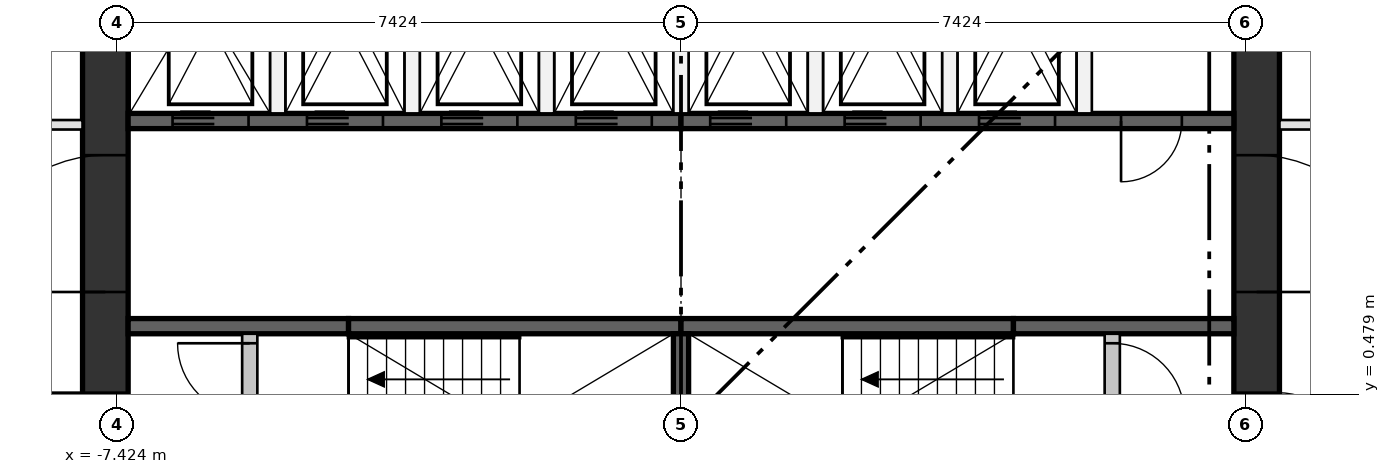
"""IFC4 building model, lengths in metres.
Left out: names, types, materials, properties, quantities, classifications, styles, units other than length and angle.
Written with IfcOpenShell. Run it as: python <this file> out.ifc"""

import sys

from ifc_helpers import new_model, si_unit, direction, frame, frame_2d, origin, place, context, subcontext, project, spatial, rectangle, extrude, element, fill, save


model = new_model("IFC4")
c1 = context("Model", 3, precision=1e-05, world=origin(), true_north=direction((0.0, 1.0)))
c2 = subcontext(c1, "Body", "Model", "MODEL_VIEW")
j1 = project(units=[si_unit("LENGTHUNIT", "METRE"), si_unit("PLANEANGLEUNIT", "RADIAN")], contexts=[c1])
p1 = place(None, origin())
s1 = spatial("IfcSite", under=j1, at=p1, CompositionType="ELEMENT")
p2 = place(p1, origin())
s2 = spatial("IfcBuilding", under=s1, at=p2, CompositionType="ELEMENT")
p3 = place(p2, frame((0.0, 0.0, 131.0)))
s3 = spatial("IfcBuildingStorey", under=s2, at=p3, CompositionType="ELEMENT", Elevation=131.0)
p4 = place(p3, frame((-7.574, -7.274, 0.0), z_axis=(0.0, 0.0, 1.0), x_axis=(0.0, 1.0, 0.0)))
e1 = element("IfcWall", 1, at=p4, inside=s3, PredefinedType="SHEAR", context=c2, shape_type="SweptSolid", body=[
    extrude(rectangle(XDim=14.548, YDim=0.6, at=frame_2d((7.274, 0.0))), origin(), (0.0, 0.0, 1.0), 3.35),
])
p5 = place(p4, frame((6.774, 0.0, 0.0)))
e2 = element("IfcOpeningElement", 2, at=p5, cuts=e1, PredefinedType="OPENING", context=c2, shape_type="SweptSolid", body=[
    extrude(rectangle(XDim=1.0, YDim=2.1, at=frame_2d((0.5, 1.05))), frame((0.0, 0.31, 0.0), z_axis=(0.0, -1.0, 0.0), x_axis=(1.0, 0.0, 0.0)), (0.0, 0.0, 1.0), 0.62),
])
p6 = place(p4, frame((3.649, 0.0, 0.0)))
e3 = element("IfcOpeningElement", 3, at=p6, cuts=e1, PredefinedType="OPENING", context=c2, shape_type="SweptSolid", body=[
    extrude(rectangle(XDim=1.8, YDim=2.1, at=frame_2d((0.9, 1.05))), frame((0.0, 0.31, 0.0), z_axis=(0.0, -1.0, 0.0), x_axis=(1.0, 0.0, 0.0)), (0.0, 0.0, 1.0), 0.62),
])
p7 = place(p4, frame((9.098, 0.0, 0.0)))
e4 = element("IfcOpeningElement", 4, at=p7, cuts=e1, PredefinedType="OPENING", context=c2, shape_type="SweptSolid", body=[
    extrude(rectangle(XDim=1.8, YDim=2.1, at=frame_2d((0.9, 1.05))), frame((0.0, 0.31, 0.0), z_axis=(0.0, -1.0, 0.0), x_axis=(1.0, 0.0, 0.0)), (0.0, 0.0, 1.0), 0.62),
])
p8 = place(p3, frame((7.574, -7.274, 0.0), z_axis=(0.0, 0.0, 1.0), x_axis=(0.0, 1.0, 0.0)))
e5 = element("IfcWall", 5, at=p8, inside=s3, PredefinedType="SHEAR", context=c2, shape_type="SweptSolid", body=[
    extrude(rectangle(XDim=14.548, YDim=0.6, at=frame_2d((7.274, 0.0))), origin(), (0.0, 0.0, 1.0), 3.35),
])
p9 = place(p8, frame((6.774, 0.0, 0.0)))
e6 = element("IfcOpeningElement", 6, at=p9, cuts=e5, PredefinedType="OPENING", context=c2, shape_type="SweptSolid", body=[
    extrude(rectangle(XDim=1.0, YDim=2.1, at=frame_2d((0.5, 1.05))), frame((0.0, 0.31, 0.0), z_axis=(0.0, -1.0, 0.0), x_axis=(1.0, 0.0, 0.0)), (0.0, 0.0, 1.0), 0.62),
])
p10 = place(p8, frame((3.649, 0.0, 0.0)))
e7 = element("IfcOpeningElement", 7, at=p10, cuts=e5, PredefinedType="OPENING", context=c2, shape_type="SweptSolid", body=[
    extrude(rectangle(XDim=1.8, YDim=2.1, at=frame_2d((0.9, 1.05))), frame((0.0, 0.31, 0.0), z_axis=(0.0, -1.0, 0.0), x_axis=(1.0, 0.0, 0.0)), (0.0, 0.0, 1.0), 0.62),
])
p11 = place(p8, frame((9.098, 0.0, 0.0)))
e8 = element("IfcOpeningElement", 8, at=p11, cuts=e5, PredefinedType="OPENING", context=c2, shape_type="SweptSolid", body=[
    extrude(rectangle(XDim=1.8, YDim=2.1, at=frame_2d((0.9, 1.05))), frame((0.0, 0.31, 0.0), z_axis=(0.0, -1.0, 0.0), x_axis=(1.0, 0.0, 0.0)), (0.0, 0.0, 1.0), 0.62),
])
p12 = place(p3, frame((-7.274, 4.074, 0.0), z_axis=(0.0, 0.0, 1.0), x_axis=(1.0, 0.0, 0.0)))
e9 = element("IfcWall", 9, at=p12, inside=s3, PredefinedType="SHEAR", context=c2, shape_type="SweptSolid", body=[
    extrude(rectangle(XDim=7.274, YDim=0.2, at=frame_2d((3.637, 0.0))), origin(), (0.0, 0.0, 1.0), 3.0),
])
p13 = place(p12, frame((0.584, 0.0, 0.0)))
e10 = element("IfcOpeningElement", 10, at=p13, cuts=e9, PredefinedType="OPENING", context=c2, shape_type="SweptSolid", body=[
    extrude(rectangle(XDim=1.0, YDim=2.1, at=frame_2d((0.5, 1.05))), frame((0.0, 0.11, 0.0), z_axis=(0.0, -1.0, 0.0), x_axis=(1.0, 0.0, 0.0)), (0.0, 0.0, 1.0), 0.22),
])
p14 = place(p12, frame((2.353, 0.0, 0.0)))
e11 = element("IfcOpeningElement", 11, at=p14, cuts=e9, PredefinedType="OPENING", context=c2, shape_type="SweptSolid", body=[
    extrude(rectangle(XDim=1.0, YDim=2.1, at=frame_2d((0.5, 1.05))), frame((0.0, 0.11, 0.0), z_axis=(0.0, -1.0, 0.0), x_axis=(1.0, 0.0, 0.0)), (0.0, 0.0, 1.0), 0.22),
])
p15 = place(p12, frame((4.121, 0.0, 0.0)))
e12 = element("IfcOpeningElement", 12, at=p15, cuts=e9, PredefinedType="OPENING", context=c2, shape_type="SweptSolid", body=[
    extrude(rectangle(XDim=1.0, YDim=2.1, at=frame_2d((0.5, 1.05))), frame((0.0, 0.11, 0.0), z_axis=(0.0, -1.0, 0.0), x_axis=(1.0, 0.0, 0.0)), (0.0, 0.0, 1.0), 0.22),
])
p16 = place(p12, frame((5.89, 0.0, 0.0)))
e13 = element("IfcOpeningElement", 13, at=p16, cuts=e9, PredefinedType="OPENING", context=c2, shape_type="SweptSolid", body=[
    extrude(rectangle(XDim=1.0, YDim=2.1, at=frame_2d((0.5, 1.05))), frame((0.0, 0.11, 0.0), z_axis=(0.0, -1.0, 0.0), x_axis=(1.0, 0.0, 0.0)), (0.0, 0.0, 1.0), 0.22),
])
p17 = place(p3, frame((0.0, 4.074, 0.0), z_axis=(0.0, 0.0, 1.0), x_axis=(1.0, 0.0, 0.0)))
e14 = element("IfcWall", 14, at=p17, inside=s3, PredefinedType="SHEAR", context=c2, shape_type="SweptSolid", body=[
    extrude(rectangle(XDim=7.274, YDim=0.2, at=frame_2d((3.637, 0.0))), origin(), (0.0, 0.0, 1.0), 3.0),
])
p18 = place(p17, frame((0.384, 0.0, 0.0)))
e15 = element("IfcOpeningElement", 15, at=p18, cuts=e14, PredefinedType="OPENING", context=c2, shape_type="SweptSolid", body=[
    extrude(rectangle(XDim=1.0, YDim=2.1, at=frame_2d((0.5, 1.05))), frame((0.0, 0.11, 0.0), z_axis=(0.0, -1.0, 0.0), x_axis=(1.0, 0.0, 0.0)), (0.0, 0.0, 1.0), 0.22),
])
p19 = place(p17, frame((2.153, 0.0, 0.0)))
e16 = element("IfcOpeningElement", 16, at=p19, cuts=e14, PredefinedType="OPENING", context=c2, shape_type="SweptSolid", body=[
    extrude(rectangle(XDim=1.0, YDim=2.1, at=frame_2d((0.5, 1.05))), frame((0.0, 0.11, 0.0), z_axis=(0.0, -1.0, 0.0), x_axis=(1.0, 0.0, 0.0)), (0.0, 0.0, 1.0), 0.22),
])
p20 = place(p17, frame((3.921, 0.0, 0.0)))
e17 = element("IfcOpeningElement", 17, at=p20, cuts=e14, PredefinedType="OPENING", context=c2, shape_type="SweptSolid", body=[
    extrude(rectangle(XDim=1.0, YDim=2.1, at=frame_2d((0.5, 1.05))), frame((0.0, 0.11, 0.0), z_axis=(0.0, -1.0, 0.0), x_axis=(1.0, 0.0, 0.0)), (0.0, 0.0, 1.0), 0.22),
])
p21 = place(p17, frame((5.79, 0.0, 0.0)))
e18 = element("IfcOpeningElement", 18, at=p21, cuts=e14, PredefinedType="OPENING", context=c2, shape_type="SweptSolid", body=[
    extrude(rectangle(XDim=0.8, YDim=2.1, at=frame_2d((0.4, 1.05))), frame((0.0, 0.11, 0.0), z_axis=(0.0, -1.0, 0.0), x_axis=(1.0, 0.0, 0.0)), (0.0, 0.0, 1.0), 0.22),
])
p22 = place(p3, frame((-7.274, 1.375, 0.0), z_axis=(0.0, 0.0, 1.0), x_axis=(1.0, 0.0, 0.0)))
e19 = element("IfcWall", 19, at=p22, inside=s3, PredefinedType="SHEAR", context=c2, shape_type="SweptSolid", body=[
    extrude(rectangle(XDim=2.9, YDim=0.2, at=frame_2d((1.45, 0.0))), origin(), (0.0, 0.0, 1.0), 3.0),
])
for number, where, z_axis, x_axis in (
    (20, (-4.374, 1.375, 0.0), (0.0, 0.0, 1.0), (1.0, 0.0, 0.0)),
    (21, (0.0, 1.375, 0.0), (0.0, 0.0, 1.0), (1.0, 0.0, 0.0)),
):
    element("IfcWall", number, at=place(p3, frame(where, z_axis=z_axis, x_axis=x_axis)), inside=s3, PredefinedType="SHEAR", context=c2, shape_type="SweptSolid", body=[
        extrude(rectangle(XDim=4.374, YDim=0.2, at=frame_2d((2.187, 0.0))), origin(), (0.0, 0.0, 1.0), 3.0),
    ])
p23 = place(p3, frame((4.374, 1.375, 0.0), z_axis=(0.0, 0.0, 1.0), x_axis=(1.0, 0.0, 0.0)))
e22 = element("IfcWall", 22, at=p23, inside=s3, PredefinedType="SHEAR", context=c2, shape_type="SweptSolid", body=[
    extrude(rectangle(XDim=2.9, YDim=0.2, at=frame_2d((1.45, 0.0))), origin(), (0.0, 0.0, 1.0), 3.0),
])
p24 = place(p3, frame((0.0, -1.275, 0.0), z_axis=(0.0, 0.0, 1.0), x_axis=(0.0, 1.0, 0.0)))
e23 = element("IfcWall", 23, at=p24, inside=s3, PredefinedType="SHEAR", context=c2, shape_type="SweptSolid", body=[
    extrude(rectangle(XDim=2.55, YDim=0.2, at=frame_2d((1.275, 0.0))), origin(), (0.0, 0.0, 1.0), 3.0),
])
for number, where, z_axis, x_axis in (
    (24, (-5.305, 4.174, 0.0), (0.0, 0.0, 1.0), (0.0, 1.0, 0.0)),
    (25, (-3.537, 4.174, 0.0), (0.0, 0.0, 1.0), (0.0, 1.0, 0.0)),
    (26, (-1.769, 4.174, 0.0), (0.0, 0.0, 1.0), (0.0, 1.0, 0.0)),
    (27, (0.0, 4.174, 0.0), (0.0, 0.0, 1.0), (0.0, 1.0, 0.0)),
    (28, (1.769, 4.174, 0.0), (0.0, 0.0, 1.0), (0.0, 1.0, 0.0)),
    (29, (3.537, 4.174, 0.0), (0.0, 0.0, 1.0), (0.0, 1.0, 0.0)),
    (30, (5.305, 4.174, 0.0), (0.0, 0.0, 1.0), (0.0, 1.0, 0.0)),
):
    element("IfcWall", number, at=place(p3, frame(where, z_axis=z_axis, x_axis=x_axis)), inside=s3, PredefinedType="PARTITIONING", context=c2, shape_type="SweptSolid", body=[
        extrude(rectangle(XDim=3.1, YDim=0.2, at=frame_2d((1.55, 0.0))), origin(), (0.0, 0.0, 1.0), 3.0),
    ])
p25 = place(p3, frame((-5.674, -1.275, 0.0), z_axis=(0.0, 0.0, 1.0), x_axis=(0.0, 1.0, 0.0)))
e31 = element("IfcWall", 31, at=p25, inside=s3, PredefinedType="PARTITIONING", context=c2, shape_type="SweptSolid", body=[
    extrude(rectangle(XDim=2.55, YDim=0.2, at=frame_2d((1.275, 0.0))), origin(), (0.0, 0.0, 1.0), 3.0),
])
p26 = place(p25, frame((0.125, 0.0, 0.0)))
e32 = element("IfcOpeningElement", 32, at=p26, cuts=e31, PredefinedType="OPENING", context=c2, shape_type="SweptSolid", body=[
    extrude(rectangle(XDim=0.95, YDim=2.1, at=frame_2d((0.475, 1.05))), frame((0.0, 0.11, 0.0), z_axis=(0.0, -1.0, 0.0), x_axis=(1.0, 0.0, 0.0)), (0.0, 0.0, 1.0), 0.22),
])
p27 = place(p25, frame((1.475, 0.0, 0.0)))
e33 = element("IfcOpeningElement", 33, at=p27, cuts=e31, PredefinedType="OPENING", context=c2, shape_type="SweptSolid", body=[
    extrude(rectangle(XDim=0.95, YDim=2.1, at=frame_2d((0.475, 1.05))), frame((0.0, 0.11, 0.0), z_axis=(0.0, -1.0, 0.0), x_axis=(1.0, 0.0, 0.0)), (0.0, 0.0, 1.0), 0.22),
])
p28 = place(p3, frame((5.674, -1.275, 0.0), z_axis=(0.0, 0.0, 1.0), x_axis=(0.0, 1.0, 0.0)))
e34 = element("IfcWall", 34, at=p28, inside=s3, PredefinedType="PARTITIONING", context=c2, shape_type="SweptSolid", body=[
    extrude(rectangle(XDim=2.55, YDim=0.2, at=frame_2d((1.275, 0.0))), origin(), (0.0, 0.0, 1.0), 3.0),
])
p29 = place(p28, frame((0.125, 0.0, 0.0)))
e35 = element("IfcOpeningElement", 35, at=p29, cuts=e34, PredefinedType="OPENING", context=c2, shape_type="SweptSolid", body=[
    extrude(rectangle(XDim=0.95, YDim=2.1, at=frame_2d((0.475, 1.05))), frame((0.0, 0.11, 0.0), z_axis=(0.0, -1.0, 0.0), x_axis=(1.0, 0.0, 0.0)), (0.0, 0.0, 1.0), 0.22),
])
p30 = place(p28, frame((1.475, 0.0, 0.0)))
e36 = element("IfcOpeningElement", 36, at=p30, cuts=e34, PredefinedType="OPENING", context=c2, shape_type="SweptSolid", body=[
    extrude(rectangle(XDim=0.95, YDim=2.1, at=frame_2d((0.475, 1.05))), frame((0.0, 0.11, 0.0), z_axis=(0.0, -1.0, 0.0), x_axis=(1.0, 0.0, 0.0)), (0.0, 0.0, 1.0), 0.22),
])
p31 = place(p3, frame((7.874, 4.024, 0.0), z_axis=(0.0, 0.0, 1.0), x_axis=(1.0, 0.0, 0.0)))
e37 = element("IfcWall", 37, at=p31, inside=s3, PredefinedType="PARTITIONING", context=c2, shape_type="SweptSolid", body=[
    extrude(rectangle(XDim=4.983, YDim=0.125, at=frame_2d((2.491, 0.0))), origin(), (0.0, 0.0, 1.0), 3.0),
])
p32 = place(p31, frame((2.0, 0.0, 0.0)))
e38 = element("IfcOpeningElement", 38, at=p32, cuts=e37, PredefinedType="OPENING", context=c2, shape_type="SweptSolid", body=[
    extrude(rectangle(XDim=1.0, YDim=2.1, at=frame_2d((0.5, 1.05))), frame((0.0, 0.073, 0.0), z_axis=(0.0, -1.0, 0.0), x_axis=(1.0, 0.0, 0.0)), (0.0, 0.0, 1.0), 0.145),
])
p33 = place(p3, frame((-14.332, 4.024, 0.0), z_axis=(0.0, 0.0, 1.0), x_axis=(1.0, 0.0, 0.0)))
e39 = element("IfcWall", 39, at=p33, inside=s3, PredefinedType="PARTITIONING", context=c2, shape_type="SweptSolid", body=[
    extrude(rectangle(XDim=6.458, YDim=0.125, at=frame_2d((3.229, 0.0))), origin(), (0.0, 0.0, 1.0), 3.0),
])
p34 = place(p33, frame((2.7, 0.0, 0.0)))
e40 = element("IfcOpeningElement", 40, at=p34, cuts=e39, PredefinedType="OPENING", context=c2, shape_type="SweptSolid", body=[
    extrude(rectangle(XDim=1.0, YDim=2.1, at=frame_2d((0.5, 1.05))), frame((0.0, 0.073, 0.0), z_axis=(0.0, -1.0, 0.0), x_axis=(1.0, 0.0, 0.0)), (0.0, 0.0, 1.0), 0.145),
])
p35 = place(p13, frame((1.0, 0.0, 0.0), z_axis=(0.0, 0.0, 1.0), x_axis=(-1.0, 0.0, 0.0)))
e41 = element("IfcDoor", 41, at=p35, inside=s3, OperationType="DOUBLE_DOOR_SLIDING", PredefinedType="DOOR", context=c2, shape_type="SweptSolid", body=[
    extrude(rectangle(XDim=1.0, YDim=2.1, at=frame_2d((0.5, 1.05))), frame((0.0, 0.025, 0.0), z_axis=(0.0, -1.0, 0.0), x_axis=(1.0, 0.0, 0.0)), (0.0, 0.0, 1.0), 0.05),
])
fill(e10, e41)
p36 = place(p14, frame((1.0, 0.0, 0.0), z_axis=(0.0, 0.0, 1.0), x_axis=(-1.0, 0.0, 0.0)))
e42 = element("IfcDoor", 42, at=p36, inside=s3, OperationType="DOUBLE_DOOR_SLIDING", PredefinedType="DOOR", context=c2, shape_type="SweptSolid", body=[
    extrude(rectangle(XDim=1.0, YDim=2.1, at=frame_2d((0.5, 1.05))), frame((0.0, 0.025, 0.0), z_axis=(0.0, -1.0, 0.0), x_axis=(1.0, 0.0, 0.0)), (0.0, 0.0, 1.0), 0.05),
])
fill(e11, e42)
p37 = place(p15, frame((1.0, 0.0, 0.0), z_axis=(0.0, 0.0, 1.0), x_axis=(-1.0, 0.0, 0.0)))
e43 = element("IfcDoor", 43, at=p37, inside=s3, OperationType="DOUBLE_DOOR_SLIDING", PredefinedType="DOOR", context=c2, shape_type="SweptSolid", body=[
    extrude(rectangle(XDim=1.0, YDim=2.1, at=frame_2d((0.5, 1.05))), frame((0.0, 0.025, 0.0), z_axis=(0.0, -1.0, 0.0), x_axis=(1.0, 0.0, 0.0)), (0.0, 0.0, 1.0), 0.05),
])
fill(e12, e43)
p38 = place(p16, frame((1.0, 0.0, 0.0), z_axis=(0.0, 0.0, 1.0), x_axis=(-1.0, 0.0, 0.0)))
e44 = element("IfcDoor", 44, at=p38, inside=s3, OperationType="DOUBLE_DOOR_SLIDING", PredefinedType="DOOR", context=c2, shape_type="SweptSolid", body=[
    extrude(rectangle(XDim=1.0, YDim=2.1, at=frame_2d((0.5, 1.05))), frame((0.0, 0.025, 0.0), z_axis=(0.0, -1.0, 0.0), x_axis=(1.0, 0.0, 0.0)), (0.0, 0.0, 1.0), 0.05),
])
fill(e13, e44)
p39 = place(p18, frame((1.0, 0.0, 0.0), z_axis=(0.0, 0.0, 1.0), x_axis=(-1.0, 0.0, 0.0)))
e45 = element("IfcDoor", 45, at=p39, inside=s3, OperationType="DOUBLE_DOOR_SLIDING", PredefinedType="DOOR", context=c2, shape_type="SweptSolid", body=[
    extrude(rectangle(XDim=1.0, YDim=2.1, at=frame_2d((0.5, 1.05))), frame((0.0, 0.025, 0.0), z_axis=(0.0, -1.0, 0.0), x_axis=(1.0, 0.0, 0.0)), (0.0, 0.0, 1.0), 0.05),
])
fill(e15, e45)
p40 = place(p19, frame((1.0, 0.0, 0.0), z_axis=(0.0, 0.0, 1.0), x_axis=(-1.0, 0.0, 0.0)))
e46 = element("IfcDoor", 46, at=p40, inside=s3, OperationType="DOUBLE_DOOR_SLIDING", PredefinedType="DOOR", context=c2, shape_type="SweptSolid", body=[
    extrude(rectangle(XDim=1.0, YDim=2.1, at=frame_2d((0.5, 1.05))), frame((0.0, 0.025, 0.0), z_axis=(0.0, -1.0, 0.0), x_axis=(1.0, 0.0, 0.0)), (0.0, 0.0, 1.0), 0.05),
])
fill(e16, e46)
p41 = place(p20, frame((1.0, 0.0, 0.0), z_axis=(0.0, 0.0, 1.0), x_axis=(-1.0, 0.0, 0.0)))
e47 = element("IfcDoor", 47, at=p41, inside=s3, OperationType="DOUBLE_DOOR_SLIDING", PredefinedType="DOOR", context=c2, shape_type="SweptSolid", body=[
    extrude(rectangle(XDim=1.0, YDim=2.1, at=frame_2d((0.5, 1.05))), frame((0.0, 0.025, 0.0), z_axis=(0.0, -1.0, 0.0), x_axis=(1.0, 0.0, 0.0)), (0.0, 0.0, 1.0), 0.05),
])
fill(e17, e47)
p42 = place(p27, origin())
e48 = element("IfcDoor", 48, at=p42, inside=s3, OperationType="SINGLE_SWING_RIGHT", PredefinedType="DOOR", context=c2, shape_type="SweptSolid", body=[
    extrude(rectangle(XDim=0.95, YDim=2.1, at=frame_2d((0.475, 1.05))), frame((0.0, 0.025, 0.0), z_axis=(0.0, -1.0, 0.0), x_axis=(1.0, 0.0, 0.0)), (0.0, 0.0, 1.0), 0.05),
])
fill(e33, e48)
p43 = place(p30, frame((0.95, 0.0, 0.0), z_axis=(0.0, 0.0, 1.0), x_axis=(-1.0, 0.0, 0.0)))
e49 = element("IfcDoor", 49, at=p43, inside=s3, OperationType="SINGLE_SWING_LEFT", PredefinedType="DOOR", context=c2, shape_type="SweptSolid", body=[
    extrude(rectangle(XDim=0.95, YDim=2.1, at=frame_2d((0.475, 1.05))), frame((0.0, 0.025, 0.0), z_axis=(0.0, -1.0, 0.0), x_axis=(1.0, 0.0, 0.0)), (0.0, 0.0, 1.0), 0.05),
])
fill(e36, e49)
p44 = place(p21, frame((0.8, 0.0, 0.0), z_axis=(0.0, 0.0, 1.0), x_axis=(-1.0, 0.0, 0.0)))
e50 = element("IfcDoor", 50, at=p44, inside=s3, OperationType="SINGLE_SWING_LEFT", PredefinedType="DOOR", context=c2, shape_type="SweptSolid", body=[
    extrude(rectangle(XDim=0.8, YDim=2.1, at=frame_2d((0.4, 1.05))), frame((0.0, 0.025, 0.0), z_axis=(0.0, -1.0, 0.0), x_axis=(1.0, 0.0, 0.0)), (0.0, 0.0, 1.0), 0.05),
])
fill(e18, e50)
p45 = place(p5, origin())
e51 = element("IfcDoor", 51, at=p45, inside=s3, OperationType="SINGLE_SWING_RIGHT", PredefinedType="DOOR", context=c2, shape_type="SweptSolid", body=[
    extrude(rectangle(XDim=1.0, YDim=2.1, at=frame_2d((0.5, 1.05))), frame((0.0, 0.3, 0.0), z_axis=(0.0, -1.0, 0.0), x_axis=(1.0, 0.0, 0.0)), (0.0, 0.0, 1.0), 0.05),
])
fill(e2, e51)
p46 = place(p7, origin())
e52 = element("IfcDoor", 52, at=p46, inside=s3, OperationType="DOUBLE_DOOR_SINGLE_SWING", PredefinedType="DOOR", context=c2, shape_type="SweptSolid", body=[
    extrude(rectangle(XDim=1.8, YDim=2.1, at=frame_2d((0.9, 1.05))), frame((0.0, 0.025, 0.0), z_axis=(0.0, -1.0, 0.0), x_axis=(1.0, 0.0, 0.0)), (0.0, 0.0, 1.0), 0.05),
])
fill(e4, e52)
p47 = place(p9, frame((1.0, 0.0, 0.0), z_axis=(0.0, 0.0, 1.0), x_axis=(-1.0, 0.0, 0.0)))
e53 = element("IfcDoor", 53, at=p47, inside=s3, OperationType="SINGLE_SWING_LEFT", PredefinedType="DOOR", context=c2, shape_type="SweptSolid", body=[
    extrude(rectangle(XDim=1.0, YDim=2.1, at=frame_2d((0.5, 1.05))), frame((0.0, 0.3, 0.0), z_axis=(0.0, -1.0, 0.0), x_axis=(1.0, 0.0, 0.0)), (0.0, 0.0, 1.0), 0.05),
])
fill(e6, e53)
p48 = place(p11, frame((1.8, 0.0, 0.0), z_axis=(0.0, 0.0, 1.0), x_axis=(-1.0, 0.0, 0.0)))
e54 = element("IfcDoor", 54, at=p48, inside=s3, OperationType="DOUBLE_DOOR_SINGLE_SWING", PredefinedType="DOOR", context=c2, shape_type="SweptSolid", body=[
    extrude(rectangle(XDim=1.8, YDim=2.1, at=frame_2d((0.9, 1.05))), frame((0.0, 0.025, 0.0), z_axis=(0.0, -1.0, 0.0), x_axis=(1.0, 0.0, 0.0)), (0.0, 0.0, 1.0), 0.05),
])
fill(e8, e54)
save(model, sys.argv[1])
